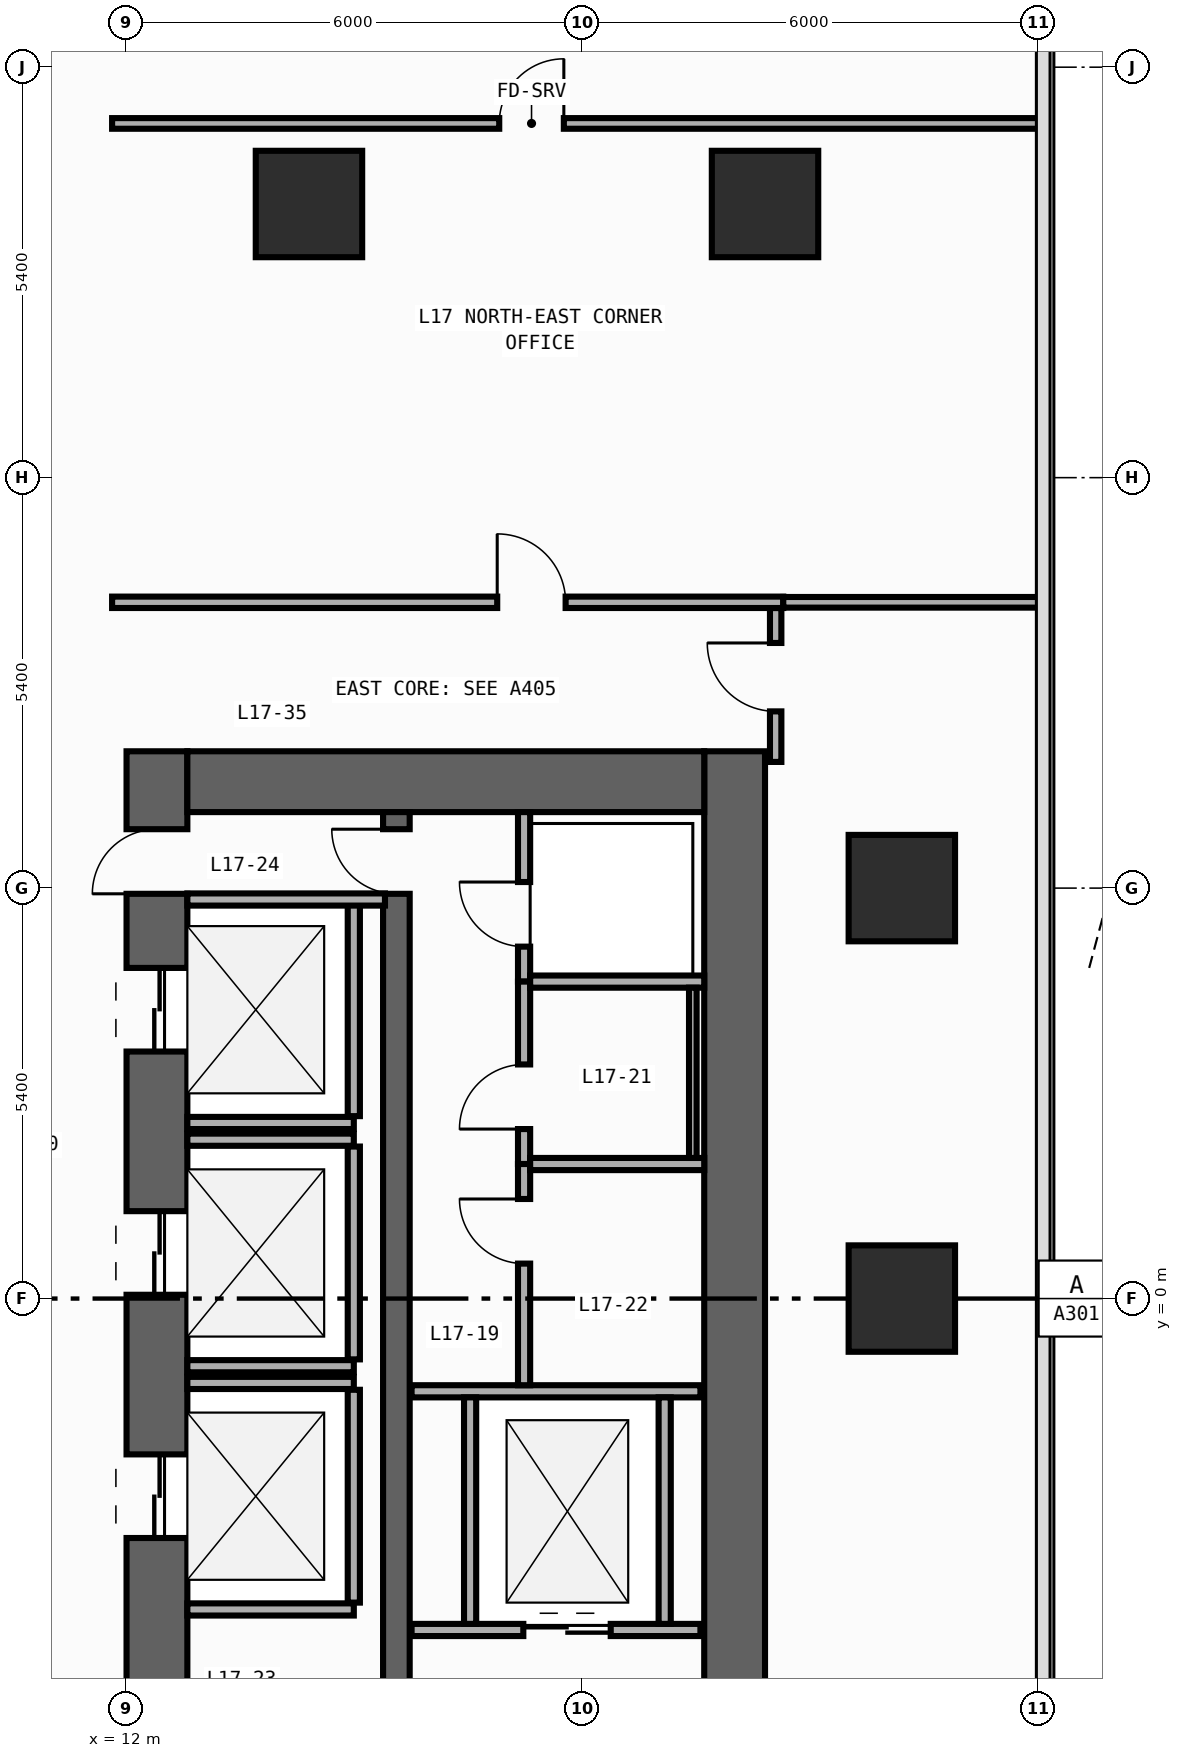
"""IFC4 building model, lengths in metres.
Left out: names, types, materials, properties, quantities, classifications, styles, units other than length and angle.
Written with IfcOpenShell. Run it as: python <this file> out.ifc"""

import sys

from ifc_helpers import new_model, si_unit, direction, frame, frame_2d, origin, origin_2d, place, context, subcontext, project, spatial, rectangle, extrude, element, fill, save


model = new_model("IFC4")
c1 = context("Model", 3, precision=1e-05, world=origin(), true_north=direction((0.0, 1.0)))
c2 = subcontext(c1, "Body", "Model", "MODEL_VIEW")
j1 = project(units=[si_unit("LENGTHUNIT", "METRE"), si_unit("PLANEANGLEUNIT", "RADIAN")], contexts=[c1])
p1 = place(None, origin())
s1 = spatial("IfcSite", under=j1, at=p1, CompositionType="ELEMENT")
p2 = place(p1, origin())
s2 = spatial("IfcBuilding", under=s1, at=p2, CompositionType="ELEMENT")
p3 = place(p2, frame((0.0, 0.0, 72.2)))
s3 = spatial("IfcBuildingStorey", under=s2, at=p3, CompositionType="ELEMENT", Elevation=72.2)
p4 = place(p3, frame((12.4, -19.8, 0.0), z_axis=(0.0, 0.0, 1.0), x_axis=(0.0, 1.0, 0.0)))
e1 = element("IfcWall", 1, at=p4, inside=s3, PredefinedType="SHEAR", context=c2, shape_type="SweptSolid", body=[
    extrude(rectangle(XDim=27.0, YDim=0.8, at=frame_2d((13.5, 0.0))), origin(), (0.0, 0.0, 1.0), 3.94),
])
p5 = place(p4, frame((23.05, 0.0, 0.0)))
e2 = element("IfcOpeningElement", 2, at=p5, cuts=e1, PredefinedType="OPENING", context=c2, shape_type="SweptSolid", body=[
    extrude(rectangle(XDim=1.1, YDim=2.2, at=frame_2d((0.55, 1.1))), frame((0.0, 0.41, 0.0), z_axis=(0.0, -1.0, 0.0), x_axis=(1.0, 0.0, 0.0)), (0.0, 0.0, 1.0), 0.82),
])
p6 = place(p4, frame((19.85, 0.0, 0.0)))
e3 = element("IfcOpeningElement", 3, at=p6, cuts=e1, PredefinedType="OPENING", context=c2, shape_type="SweptSolid", body=[
    extrude(rectangle(XDim=1.1, YDim=2.2, at=frame_2d((0.55, 1.1))), frame((0.0, 0.41, 0.0), z_axis=(0.0, -1.0, 0.0), x_axis=(1.0, 0.0, 0.0)), (0.0, 0.0, 1.0), 0.82),
])
p7 = place(p4, frame((16.65, 0.0, 0.0)))
e4 = element("IfcOpeningElement", 4, at=p7, cuts=e1, PredefinedType="OPENING", context=c2, shape_type="SweptSolid", body=[
    extrude(rectangle(XDim=1.1, YDim=2.2, at=frame_2d((0.55, 1.1))), frame((0.0, 0.41, 0.0), z_axis=(0.0, -1.0, 0.0), x_axis=(1.0, 0.0, 0.0)), (0.0, 0.0, 1.0), 0.82),
])
p8 = place(p4, frame((10.175, 0.0, 0.0)))
e5 = element("IfcOpeningElement", 5, at=p8, cuts=e1, PredefinedType="OPENING", context=c2, shape_type="SweptSolid", body=[
    extrude(rectangle(XDim=0.85, YDim=2.1, at=frame_2d((0.425, 1.05))), frame((0.0, 0.41, 0.0), z_axis=(0.0, -1.0, 0.0), x_axis=(1.0, 0.0, 0.0)), (0.0, 0.0, 1.0), 0.82),
])
p9 = place(p4, frame((12.725, 0.0, 0.0)))
e6 = element("IfcOpeningElement", 6, at=p9, cuts=e1, PredefinedType="OPENING", context=c2, shape_type="SweptSolid", body=[
    extrude(rectangle(XDim=1.15, YDim=2.2, at=frame_2d((0.575, 1.1))), frame((0.0, 0.41, 0.0), z_axis=(0.0, -1.0, 0.0), x_axis=(1.0, 0.0, 0.0)), (0.0, 0.0, 1.0), 0.82),
])
p10 = place(p4, frame((25.125, 0.0, 0.0)))
e7 = element("IfcOpeningElement", 7, at=p10, cuts=e1, PredefinedType="OPENING", context=c2, shape_type="SweptSolid", body=[
    extrude(rectangle(XDim=0.85, YDim=2.1, at=frame_2d((0.425, 1.05))), frame((0.0, 0.41, 0.0), z_axis=(0.0, -1.0, 0.0), x_axis=(1.0, 0.0, 0.0)), (0.0, 0.0, 1.0), 0.82),
])
p11 = place(p3, frame((20.0, -19.8, 0.0), z_axis=(0.0, 0.0, 1.0), x_axis=(0.0, 1.0, 0.0)))
e8 = element("IfcWall", 8, at=p11, inside=s3, PredefinedType="SHEAR", context=c2, shape_type="SweptSolid", body=[
    extrude(rectangle(XDim=27.0, YDim=0.8, at=frame_2d((13.5, 0.0))), origin(), (0.0, 0.0, 1.0), 3.94),
])
p12 = place(p3, frame((12.8, 6.8, 0.0), z_axis=(0.0, 0.0, 1.0), x_axis=(1.0, 0.0, 0.0)))
e9 = element("IfcWall", 9, at=p12, inside=s3, PredefinedType="SHEAR", context=c2, shape_type="SweptSolid", body=[
    extrude(rectangle(XDim=6.8, YDim=0.8, at=frame_2d((3.4, 0.0))), origin(), (0.0, 0.0, 1.0), 3.94),
])
p13 = place(p3, frame((15.55, -19.0, 0.0), z_axis=(0.0, 0.0, 1.0), x_axis=(0.0, 1.0, 0.0)))
e10 = element("IfcWall", 10, at=p13, inside=s3, PredefinedType="SHEAR", context=c2, shape_type="SweptSolid", body=[
    extrude(rectangle(XDim=25.4, YDim=0.35, at=frame_2d((12.7, 0.0))), origin(), (0.0, 0.0, 1.0), 3.94),
])
p14 = place(p13, frame((11.925, 0.0, 0.0)))
e11 = element("IfcOpeningElement", 11, at=p14, cuts=e10, PredefinedType="OPENING", context=c2, shape_type="SweptSolid", body=[
    extrude(rectangle(XDim=1.15, YDim=2.2, at=frame_2d((0.575, 1.1))), frame((0.0, 0.185, 0.0), z_axis=(0.0, -1.0, 0.0), x_axis=(1.0, 0.0, 0.0)), (0.0, 0.0, 1.0), 0.37),
])
p15 = place(p13, frame((24.325, 0.0, 0.0)))
e12 = element("IfcOpeningElement", 12, at=p15, cuts=e10, PredefinedType="OPENING", context=c2, shape_type="SweptSolid", body=[
    extrude(rectangle(XDim=0.85, YDim=2.1, at=frame_2d((0.425, 1.05))), frame((0.0, 0.185, 0.0), z_axis=(0.0, -1.0, 0.0), x_axis=(1.0, 0.0, 0.0)), (0.0, 0.0, 1.0), 0.37),
])
for number, where, z_axis, x_axis in (
    (13, (20.4, 14.4, 0.0), (0.0, 0.0, 1.0), (1.0, 0.0, 0.0)),
    (14, (14.4, 14.4, 0.0), (0.0, 0.0, 1.0), (1.0, 0.0, 0.0)),
    (15, (22.2, 0.0, 0.0), (0.0, 0.0, 1.0), (1.0, 0.0, 0.0)),
    (16, (22.2, 5.4, 0.0), (0.0, 0.0, 1.0), (1.0, 0.0, 0.0)),
):
    element("IfcColumn", number, at=place(p3, frame(where, z_axis=z_axis, x_axis=x_axis)), inside=s3, PredefinedType="COLUMN", context=c2, shape_type="SweptSolid", body=[
        extrude(rectangle(XDim=1.4, YDim=1.4, at=origin_2d()), origin(), (0.0, 0.0, 1.0), 4.2),
    ])
p16 = place(p3, frame((12.8, 2.31, 0.0), z_axis=(0.0, 0.0, 1.0), x_axis=(1.0, 0.0, 0.0)))
e17 = element("IfcWall", 17, at=p16, inside=s3, PredefinedType="STANDARD", context=c2, shape_type="SweptSolid", body=[
    extrude(rectangle(XDim=2.19, YDim=0.16, at=frame_2d((1.095, 0.0))), origin(), (0.0, 0.0, 1.0), 3.94),
])
p17 = place(p3, frame((14.99, 2.4, 0.0), z_axis=(0.0, 0.0, 1.0), x_axis=(0.0, 1.0, 0.0)))
e18 = element("IfcWall", 18, at=p17, inside=s3, PredefinedType="STANDARD", context=c2, shape_type="SweptSolid", body=[
    extrude(rectangle(XDim=2.8, YDim=0.16, at=frame_2d((1.4, 0.0))), origin(), (0.0, 0.0, 1.0), 3.94),
])
for number, where, z_axis, x_axis in (
    (19, (12.8, -0.89, 0.0), (0.0, 0.0, 1.0), (1.0, 0.0, 0.0)),
    (20, (12.8, 2.09, 0.0), (0.0, 0.0, 1.0), (1.0, 0.0, 0.0)),
):
    element("IfcWall", number, at=place(p3, frame(where, z_axis=z_axis, x_axis=x_axis)), inside=s3, PredefinedType="STANDARD", context=c2, shape_type="SweptSolid", body=[
        extrude(rectangle(XDim=2.19, YDim=0.16, at=frame_2d((1.095, 0.0))), origin(), (0.0, 0.0, 1.0), 3.94),
    ])
p18 = place(p3, frame((14.99, -0.8, 0.0), z_axis=(0.0, 0.0, 1.0), x_axis=(0.0, 1.0, 0.0)))
e21 = element("IfcWall", 21, at=p18, inside=s3, PredefinedType="STANDARD", context=c2, shape_type="SweptSolid", body=[
    extrude(rectangle(XDim=2.8, YDim=0.16, at=frame_2d((1.4, 0.0))), origin(), (0.0, 0.0, 1.0), 3.94),
])
for number, where, z_axis, x_axis in (
    (22, (12.8, -4.09, 0.0), (0.0, 0.0, 1.0), (1.0, 0.0, 0.0)),
    (23, (12.8, -1.11, 0.0), (0.0, 0.0, 1.0), (1.0, 0.0, 0.0)),
):
    element("IfcWall", number, at=place(p3, frame(where, z_axis=z_axis, x_axis=x_axis)), inside=s3, PredefinedType="STANDARD", context=c2, shape_type="SweptSolid", body=[
        extrude(rectangle(XDim=2.19, YDim=0.16, at=frame_2d((1.095, 0.0))), origin(), (0.0, 0.0, 1.0), 3.94),
    ])
p19 = place(p3, frame((14.99, -4.0, 0.0), z_axis=(0.0, 0.0, 1.0), x_axis=(0.0, 1.0, 0.0)))
e24 = element("IfcWall", 24, at=p19, inside=s3, PredefinedType="STANDARD", context=c2, shape_type="SweptSolid", body=[
    extrude(rectangle(XDim=2.8, YDim=0.16, at=frame_2d((1.4, 0.0))), origin(), (0.0, 0.0, 1.0), 3.94),
])
p20 = place(p3, frame((15.75, -4.36, 0.0), z_axis=(0.0, 0.0, 1.0), x_axis=(1.0, 0.0, 0.0)))
e25 = element("IfcWall", 25, at=p20, inside=s3, PredefinedType="STANDARD", context=c2, shape_type="SweptSolid", body=[
    extrude(rectangle(XDim=3.8, YDim=0.16, at=frame_2d((1.9, 0.0))), origin(), (0.0, 0.0, 1.0), 3.94),
])
p21 = place(p20, frame((1.47, 0.0, 0.0)))
e26 = element("IfcOpeningElement", 26, at=p21, cuts=e25, PredefinedType="OPENING", context=c2, shape_type="SweptSolid", body=[
    extrude(rectangle(XDim=1.15, YDim=2.2, at=frame_2d((0.575, 1.1))), frame((0.0, 0.09, 0.0), z_axis=(0.0, -1.0, 0.0), x_axis=(1.0, 0.0, 0.0)), (0.0, 0.0, 1.0), 0.18),
])
p22 = place(p3, frame((15.75, -1.22, 0.0), z_axis=(0.0, 0.0, 1.0), x_axis=(1.0, 0.0, 0.0)))
e27 = element("IfcWall", 27, at=p22, inside=s3, PredefinedType="STANDARD", context=c2, shape_type="SweptSolid", body=[
    extrude(rectangle(XDim=3.8, YDim=0.16, at=frame_2d((1.9, 0.0))), origin(), (0.0, 0.0, 1.0), 3.94),
])
for number, where, z_axis, x_axis in (
    (28, (16.52, -4.28, 0.0), (0.0, 0.0, 1.0), (0.0, 1.0, 0.0)),
    (29, (19.08, -4.28, 0.0), (0.0, 0.0, 1.0), (0.0, 1.0, 0.0)),
):
    element("IfcWall", number, at=place(p3, frame(where, z_axis=z_axis, x_axis=x_axis)), inside=s3, PredefinedType="STANDARD", context=c2, shape_type="SweptSolid", body=[
        extrude(rectangle(XDim=2.98, YDim=0.16, at=frame_2d((1.49, 0.0))), origin(), (0.0, 0.0, 1.0), 3.94),
    ])
p23 = place(p3, frame((12.8, 5.25, 0.0), z_axis=(0.0, 0.0, 1.0), x_axis=(1.0, 0.0, 0.0)))
e30 = element("IfcWall", 30, at=p23, inside=s3, PredefinedType="STANDARD", context=c2, shape_type="SweptSolid", body=[
    extrude(rectangle(XDim=2.6, YDim=0.16, at=frame_2d((1.3, 0.0))), origin(), (0.0, 0.0, 1.0), 3.94),
])
p24 = place(p3, frame((17.23, 4.17, 0.0), z_axis=(0.0, 0.0, 1.0), x_axis=(0.0, 1.0, 0.0)))
e31 = element("IfcWall", 31, at=p24, inside=s3, PredefinedType="PARTITIONING", context=c2, shape_type="SweptSolid", body=[
    extrude(rectangle(XDim=2.23, YDim=0.16, at=frame_2d((1.115, 0.0))), origin(), (0.0, 0.0, 1.0), 3.94),
])
p25 = place(p24, frame((0.46, 0.0, 0.0)))
e32 = element("IfcOpeningElement", 32, at=p25, cuts=e31, PredefinedType="OPENING", context=c2, shape_type="SweptSolid", body=[
    extrude(rectangle(XDim=0.85, YDim=2.1, at=frame_2d((0.425, 1.05))), frame((0.0, 0.09, 0.0), z_axis=(0.0, -1.0, 0.0), x_axis=(1.0, 0.0, 0.0)), (0.0, 0.0, 1.0), 0.18),
])
p26 = place(p3, frame((17.23, 1.77, 0.0), z_axis=(0.0, 0.0, 1.0), x_axis=(0.0, 1.0, 0.0)))
e33 = element("IfcWall", 33, at=p26, inside=s3, PredefinedType="PARTITIONING", context=c2, shape_type="SweptSolid", body=[
    extrude(rectangle(XDim=2.4, YDim=0.16, at=frame_2d((1.2, 0.0))), origin(), (0.0, 0.0, 1.0), 3.94),
])
p27 = place(p26, frame((0.46, 0.0, 0.0)))
e34 = element("IfcOpeningElement", 34, at=p27, cuts=e33, PredefinedType="OPENING", context=c2, shape_type="SweptSolid", body=[
    extrude(rectangle(XDim=0.85, YDim=2.1, at=frame_2d((0.425, 1.05))), frame((0.0, 0.09, 0.0), z_axis=(0.0, -1.0, 0.0), x_axis=(1.0, 0.0, 0.0)), (0.0, 0.0, 1.0), 0.18),
])
p28 = place(p3, frame((17.23, -1.14, 0.0), z_axis=(0.0, 0.0, 1.0), x_axis=(0.0, 1.0, 0.0)))
e35 = element("IfcWall", 35, at=p28, inside=s3, PredefinedType="PARTITIONING", context=c2, shape_type="SweptSolid", body=[
    extrude(rectangle(XDim=2.91, YDim=0.16, at=frame_2d((1.455, 0.0))), origin(), (0.0, 0.0, 1.0), 3.94),
])
p29 = place(p28, frame((1.6, 0.0, 0.0)))
e36 = element("IfcOpeningElement", 36, at=p29, cuts=e35, PredefinedType="OPENING", context=c2, shape_type="SweptSolid", body=[
    extrude(rectangle(XDim=0.85, YDim=2.1, at=frame_2d((0.425, 1.05))), frame((0.0, 0.09, 0.0), z_axis=(0.0, -1.0, 0.0), x_axis=(1.0, 0.0, 0.0)), (0.0, 0.0, 1.0), 0.18),
])
for number, where, z_axis, x_axis in (
    (37, (17.31, 4.17, 0.0), (0.0, 0.0, 1.0), (1.0, 0.0, 0.0)),
    (38, (17.31, 1.77, 0.0), (0.0, 0.0, 1.0), (1.0, 0.0, 0.0)),
):
    element("IfcWall", number, at=place(p3, frame(where, z_axis=z_axis, x_axis=x_axis)), inside=s3, PredefinedType="PARTITIONING", context=c2, shape_type="SweptSolid", body=[
        extrude(rectangle(XDim=2.29, YDim=0.16, at=frame_2d((1.145, 0.0))), origin(), (0.0, 0.0, 1.0), 3.94),
    ])
p30 = place(p3, frame((20.54, 7.06, 0.0), z_axis=(0.0, 0.0, 1.0), x_axis=(0.0, 1.0, 0.0)))
e39 = element("IfcWall", 39, at=p30, inside=s3, PredefinedType="PARTITIONING", context=c2, shape_type="SweptSolid", body=[
    extrude(rectangle(XDim=2.025, YDim=0.15, at=frame_2d((1.012, 0.0))), origin(), (0.0, 0.0, 1.0), 3.94),
])
p31 = place(p30, frame((0.665, 0.0, 0.0)))
e40 = element("IfcOpeningElement", 40, at=p31, cuts=e39, PredefinedType="OPENING", context=c2, shape_type="SweptSolid", body=[
    extrude(rectangle(XDim=0.9, YDim=2.15, at=frame_2d((0.45, 1.075))), frame((0.0, 0.085, 0.0), z_axis=(0.0, -1.0, 0.0), x_axis=(1.0, 0.0, 0.0)), (0.0, 0.0, 1.0), 0.17),
])
p32 = place(p3, frame((11.81, 9.16, 0.0), z_axis=(0.0, 0.0, 1.0), x_axis=(1.0, 0.0, 0.0)))
e41 = element("IfcWall", 41, at=p32, inside=s3, PredefinedType="PARTITIONING", context=c2, shape_type="SweptSolid", body=[
    extrude(rectangle(XDim=8.83, YDim=0.15, at=frame_2d((4.415, 0.0))), origin(), (0.0, 0.0, 1.0), 3.94),
])
p33 = place(p32, frame((5.067, 0.0, 0.0)))
e42 = element("IfcOpeningElement", 42, at=p33, cuts=e41, PredefinedType="OPENING", context=c2, shape_type="SweptSolid", body=[
    extrude(rectangle(XDim=0.9, YDim=2.15, at=frame_2d((0.45, 1.075))), frame((0.0, 0.085, 0.0), z_axis=(0.0, -1.0, 0.0), x_axis=(1.0, 0.0, 0.0)), (0.0, 0.0, 1.0), 0.17),
])
p34 = place(p3, frame((20.64, 9.16, 0.0), z_axis=(0.0, 0.0, 1.0), x_axis=(1.0, 0.0, 0.0)))
e43 = element("IfcWall", 43, at=p34, inside=s3, PredefinedType="PARTITIONING", context=c2, shape_type="SweptSolid", body=[
    extrude(rectangle(XDim=3.415, YDim=0.14, at=frame_2d((1.708, 0.0))), origin(), (0.0, 0.0, 1.0), 3.94),
])
p35 = place(p3, frame((11.81, 15.46, 0.0), z_axis=(0.0, 0.0, 1.0), x_axis=(1.0, 0.0, 0.0)))
e44 = element("IfcWall", 44, at=p35, inside=s3, PredefinedType="PARTITIONING", context=c2, shape_type="SweptSolid", body=[
    extrude(rectangle(XDim=12.245, YDim=0.14, at=frame_2d((6.123, 0.0))), origin(), (0.0, 0.0, 1.0), 3.94),
])
p36 = place(p35, frame((5.093, 0.0, 0.0)))
e45 = element("IfcOpeningElement", 45, at=p36, cuts=e44, PredefinedType="OPENING", context=c2, shape_type="SweptSolid", body=[
    extrude(rectangle(XDim=0.85, YDim=2.1, at=frame_2d((0.425, 1.05))), frame((0.0, 0.08, 0.0), z_axis=(0.0, -1.0, 0.0), x_axis=(1.0, 0.0, 0.0)), (0.0, 0.0, 1.0), 0.16),
])
p37 = place(p3, frame((19.45, 4.09, 0.0), z_axis=(0.0, 0.0, 1.0), x_axis=(0.0, -1.0, 0.0)))
e46 = element("IfcWall", 46, at=p37, inside=s3, PredefinedType="PARTITIONING", context=c2, shape_type="SweptSolid", body=[
    extrude(rectangle(XDim=2.24, YDim=0.1, at=frame_2d((1.12, 0.0))), origin(), (0.0, 0.0, 1.0), 3.94),
])
p38 = place(p5, origin())
e47 = element("IfcDoor", 47, at=p38, inside=s3, OperationType="DOUBLE_DOOR_SLIDING", PredefinedType="DOOR", context=c2, shape_type="SweptSolid", body=[
    extrude(rectangle(XDim=1.1, YDim=2.2, at=frame_2d((0.55, 1.1))), frame((0.0, 0.025, 0.0), z_axis=(0.0, -1.0, 0.0), x_axis=(1.0, 0.0, 0.0)), (0.0, 0.0, 1.0), 0.05),
])
fill(e2, e47)
p39 = place(p6, origin())
e48 = element("IfcDoor", 48, at=p39, inside=s3, OperationType="DOUBLE_DOOR_SLIDING", PredefinedType="DOOR", context=c2, shape_type="SweptSolid", body=[
    extrude(rectangle(XDim=1.1, YDim=2.2, at=frame_2d((0.55, 1.1))), frame((0.0, 0.025, 0.0), z_axis=(0.0, -1.0, 0.0), x_axis=(1.0, 0.0, 0.0)), (0.0, 0.0, 1.0), 0.05),
])
fill(e3, e48)
p40 = place(p7, origin())
e49 = element("IfcDoor", 49, at=p40, inside=s3, OperationType="DOUBLE_DOOR_SLIDING", PredefinedType="DOOR", context=c2, shape_type="SweptSolid", body=[
    extrude(rectangle(XDim=1.1, YDim=2.2, at=frame_2d((0.55, 1.1))), frame((0.0, 0.025, 0.0), z_axis=(0.0, -1.0, 0.0), x_axis=(1.0, 0.0, 0.0)), (0.0, 0.0, 1.0), 0.05),
])
fill(e4, e49)
p41 = place(p10, origin())
e50 = element("IfcDoor", 50, at=p41, inside=s3, OperationType="SINGLE_SWING_LEFT", PredefinedType="DOOR", context=c2, shape_type="SweptSolid", body=[
    extrude(rectangle(XDim=0.85, YDim=2.1, at=frame_2d((0.425, 1.05))), frame((0.0, 0.025, 0.0), z_axis=(0.0, -1.0, 0.0), x_axis=(1.0, 0.0, 0.0)), (0.0, 0.0, 1.0), 0.05),
])
fill(e7, e50)
p42 = place(p15, origin())
e51 = element("IfcDoor", 51, at=p42, inside=s3, OperationType="SINGLE_SWING_RIGHT", PredefinedType="DOOR", context=c2, shape_type="SweptSolid", body=[
    extrude(rectangle(XDim=0.85, YDim=2.1, at=frame_2d((0.425, 1.05))), frame((0.0, 0.025, 0.0), z_axis=(0.0, -1.0, 0.0), x_axis=(1.0, 0.0, 0.0)), (0.0, 0.0, 1.0), 0.05),
])
fill(e12, e51)
p43 = place(p21, origin())
e52 = element("IfcDoor", 52, at=p43, inside=s3, OperationType="DOUBLE_DOOR_SLIDING", PredefinedType="DOOR", context=c2, shape_type="SweptSolid", body=[
    extrude(rectangle(XDim=1.15, YDim=2.2, at=frame_2d((0.575, 1.1))), frame((0.0, 0.025, 0.0), z_axis=(0.0, -1.0, 0.0), x_axis=(1.0, 0.0, 0.0)), (0.0, 0.0, 1.0), 0.05),
])
fill(e26, e52)
p44 = place(p25, origin())
e53 = element("IfcDoor", 53, at=p44, inside=s3, OperationType="SINGLE_SWING_RIGHT", PredefinedType="DOOR", context=c2, shape_type="SweptSolid", body=[
    extrude(rectangle(XDim=0.85, YDim=2.1, at=frame_2d((0.425, 1.05))), frame((0.0, 0.025, 0.0), z_axis=(0.0, -1.0, 0.0), x_axis=(1.0, 0.0, 0.0)), (0.0, 0.0, 1.0), 0.05),
])
fill(e32, e53)
p45 = place(p27, origin())
e54 = element("IfcDoor", 54, at=p45, inside=s3, OperationType="SINGLE_SWING_LEFT", PredefinedType="DOOR", context=c2, shape_type="SweptSolid", body=[
    extrude(rectangle(XDim=0.85, YDim=2.1, at=frame_2d((0.425, 1.05))), frame((0.0, 0.025, 0.0), z_axis=(0.0, -1.0, 0.0), x_axis=(1.0, 0.0, 0.0)), (0.0, 0.0, 1.0), 0.05),
])
fill(e34, e54)
p46 = place(p29, origin())
e55 = element("IfcDoor", 55, at=p46, inside=s3, OperationType="SINGLE_SWING_RIGHT", PredefinedType="DOOR", context=c2, shape_type="SweptSolid", body=[
    extrude(rectangle(XDim=0.85, YDim=2.1, at=frame_2d((0.425, 1.05))), frame((0.0, 0.025, 0.0), z_axis=(0.0, -1.0, 0.0), x_axis=(1.0, 0.0, 0.0)), (0.0, 0.0, 1.0), 0.05),
])
fill(e36, e55)
p47 = place(p31, origin())
e56 = element("IfcDoor", 56, at=p47, inside=s3, OperationType="SINGLE_SWING_RIGHT", PredefinedType="DOOR", context=c2, shape_type="SweptSolid", body=[
    extrude(rectangle(XDim=0.9, YDim=2.15, at=frame_2d((0.45, 1.075))), frame((0.0, 0.025, 0.0), z_axis=(0.0, -1.0, 0.0), x_axis=(1.0, 0.0, 0.0)), (0.0, 0.0, 1.0), 0.05),
])
fill(e40, e56)
p48 = place(p33, origin())
e57 = element("IfcDoor", 57, at=p48, inside=s3, OperationType="SINGLE_SWING_LEFT", PredefinedType="DOOR", context=c2, shape_type="SweptSolid", body=[
    extrude(rectangle(XDim=0.9, YDim=2.15, at=frame_2d((0.45, 1.075))), frame((0.0, 0.025, 0.0), z_axis=(0.0, -1.0, 0.0), x_axis=(1.0, 0.0, 0.0)), (0.0, 0.0, 1.0), 0.05),
])
fill(e42, e57)
p49 = place(p36, origin())
e58 = element("IfcDoor", 58, at=p49, inside=s3, OperationType="SINGLE_SWING_RIGHT", PredefinedType="DOOR", context=c2, shape_type="SweptSolid", body=[
    extrude(rectangle(XDim=0.85, YDim=2.1, at=frame_2d((0.425, 1.05))), frame((0.0, 0.025, 0.0), z_axis=(0.0, -1.0, 0.0), x_axis=(1.0, 0.0, 0.0)), (0.0, 0.0, 1.0), 0.05),
])
fill(e45, e58)
save(model, sys.argv[1])
